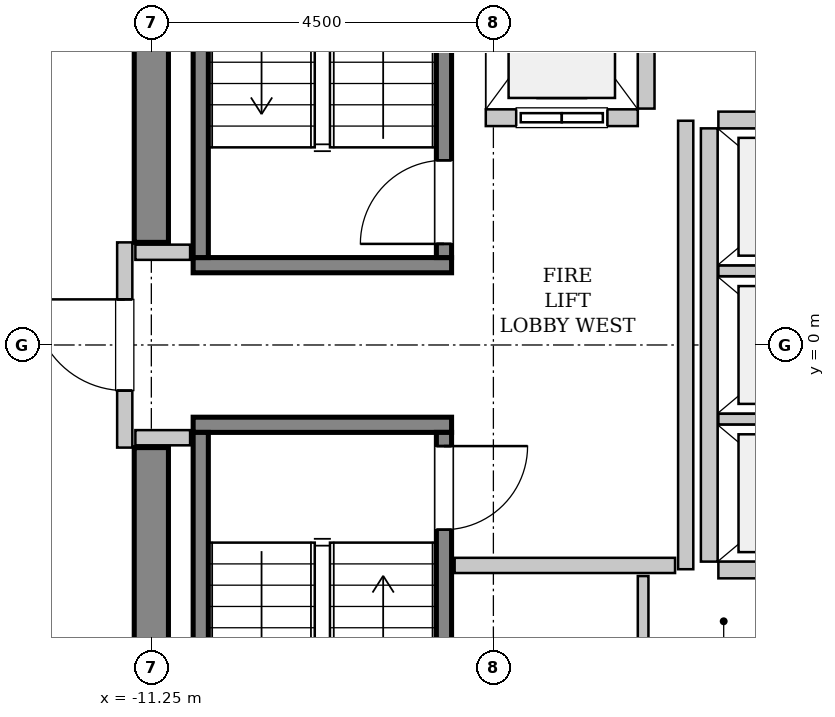
"""IFC4 building model, lengths in metres.
Left out: names, types, materials, properties, quantities, classifications, styles, units other than length and angle.
Written with IfcOpenShell. Run it as: python <this file> out.ifc"""

import sys

from ifc_helpers import new_model, si_unit, direction, frame, frame_2d, origin, place, context, subcontext, project, spatial, rectangle, extrude, source, transform, mapped, element, fill, save


model = new_model("IFC4")
c1 = context("Model", 3, precision=1e-05, world=origin(), true_north=direction((0.0, 1.0)))
c2 = subcontext(c1, "Body", "Model", "MODEL_VIEW")
j1 = project(units=[si_unit("LENGTHUNIT", "METRE"), si_unit("PLANEANGLEUNIT", "RADIAN")], contexts=[c1])
p1 = place(None, origin())
s1 = spatial("IfcSite", under=j1, at=p1, CompositionType="ELEMENT")
p2 = place(p1, origin())
s2 = spatial("IfcBuilding", under=s1, at=p2, CompositionType="ELEMENT")
p3 = place(p2, frame((0.0, 0.0, 259.8)))
s3 = spatial("IfcBuildingStorey", under=s2, at=p3, CompositionType="ELEMENT", Elevation=259.8)
m1 = source(origin(), c2, "Body", "SweptSolid", [
    extrude(rectangle(XDim=7.425, YDim=0.45, at=frame_2d((3.712, 0.0))), origin(), (0.0, 0.0, 1.0), 4.8),
])
for number, where, z_axis, x_axis in (
    (1, (-11.25, -8.775, 0.0), (0.0, 0.0, 1.0), (0.0, 1.0, 0.0)),
    (2, (-11.25, 1.35, 0.0), (0.0, 0.0, 1.0), (0.0, 1.0, 0.0)),
):
    element("IfcWall", number, at=place(p3, frame(where, z_axis=z_axis, x_axis=x_axis)), inside=s3, PredefinedType="SHEAR", context=c2, shape_type="MappedRepresentation", body=[
        mapped(m1, transform((0.0, 0.0, 0.0), x_axis=(1.0, 0.0, 0.0), y_axis=(0.0, 1.0, 0.0), z_axis=(0.0, 0.0, 1.0), scale=1.0)),
    ])
m2 = source(origin(), c2, "Body", "SweptSolid", [
    extrude(rectangle(XDim=3.4, YDim=0.2, at=frame_2d((1.7, 0.0))), origin(), (0.0, 0.0, 1.0), 4.8),
])
p4 = place(p3, frame((-7.3, 1.05, 0.0), z_axis=(0.0, 0.0, 1.0), x_axis=(-1.0, 0.0, 0.0)))
e3 = element("IfcWall", 3, at=p4, inside=s3, PredefinedType="SOLIDWALL", context=c2, shape_type="MappedRepresentation", body=[
    mapped(m2, transform((0.0, 0.0, 0.0), x_axis=(1.0, 0.0, 0.0), y_axis=(0.0, 1.0, 0.0), z_axis=(0.0, 0.0, 1.0), scale=1.0)),
])
m3 = source(origin(), c2, "Body", "SweptSolid", [
    extrude(rectangle(XDim=7.1, YDim=0.2, at=frame_2d((3.55, 0.0))), origin(), (0.0, 0.0, 1.0), 4.8),
])
p5 = place(p3, frame((-7.4, 1.15, 0.0), z_axis=(0.0, 0.0, 1.0), x_axis=(0.0, 1.0, 0.0)))
e4 = element("IfcWall", 4, at=p5, inside=s3, PredefinedType="SOLIDWALL", context=c2, shape_type="MappedRepresentation", body=[
    mapped(m3, transform((0.0, 0.0, 0.0), x_axis=(1.0, 0.0, 0.0), y_axis=(0.0, 1.0, 0.0), z_axis=(0.0, 0.0, 1.0), scale=1.0)),
])
p6 = place(p5, frame((0.18, 0.0, 0.0)))
e5 = element("IfcOpeningElement", 5, at=p6, cuts=e4, PredefinedType="OPENING", context=c2, shape_type="SweptSolid", body=[
    extrude(rectangle(XDim=1.1, YDim=2.15, at=frame_2d((0.55, 1.075))), frame((0.0, 0.11, 0.0), z_axis=(0.0, -1.0, 0.0), x_axis=(1.0, 0.0, 0.0)), (0.0, 0.0, 1.0), 0.22),
])
p7 = place(p3, frame((-10.6, 1.15, 0.0), z_axis=(0.0, 0.0, 1.0), x_axis=(0.0, 1.0, 0.0)))
e6 = element("IfcWall", 6, at=p7, inside=s3, PredefinedType="SOLIDWALL", context=c2, shape_type="MappedRepresentation", body=[
    mapped(m3, transform((0.0, 0.0, 0.0), x_axis=(1.0, 0.0, 0.0), y_axis=(0.0, 1.0, 0.0), z_axis=(0.0, 0.0, 1.0), scale=1.0)),
])
p8 = place(p3, frame((-10.7, -1.05, 0.0), z_axis=(0.0, 0.0, 1.0), x_axis=(1.0, 0.0, 0.0)))
e7 = element("IfcWall", 7, at=p8, inside=s3, PredefinedType="SOLIDWALL", context=c2, shape_type="MappedRepresentation", body=[
    mapped(m2, transform((0.0, 0.0, 0.0), x_axis=(1.0, 0.0, 0.0), y_axis=(0.0, 1.0, 0.0), z_axis=(0.0, 0.0, 1.0), scale=1.0)),
])
p9 = place(p3, frame((-10.6, -1.15, 0.0), z_axis=(0.0, 0.0, 1.0), x_axis=(0.0, -1.0, 0.0)))
e8 = element("IfcWall", 8, at=p9, inside=s3, PredefinedType="SOLIDWALL", context=c2, shape_type="MappedRepresentation", body=[
    mapped(m3, transform((0.0, 0.0, 0.0), x_axis=(1.0, 0.0, 0.0), y_axis=(0.0, 1.0, 0.0), z_axis=(0.0, 0.0, 1.0), scale=1.0)),
])
p10 = place(p3, frame((-7.4, -1.15, 0.0), z_axis=(0.0, 0.0, 1.0), x_axis=(0.0, -1.0, 0.0)))
e9 = element("IfcWall", 9, at=p10, inside=s3, PredefinedType="SOLIDWALL", context=c2, shape_type="MappedRepresentation", body=[
    mapped(m3, transform((0.0, 0.0, 0.0), x_axis=(1.0, 0.0, 0.0), y_axis=(0.0, 1.0, 0.0), z_axis=(0.0, 0.0, 1.0), scale=1.0)),
])
p11 = place(p10, frame((0.18, 0.0, 0.0)))
e10 = element("IfcOpeningElement", 10, at=p11, cuts=e9, PredefinedType="OPENING", context=c2, shape_type="SweptSolid", body=[
    extrude(rectangle(XDim=1.1, YDim=2.15, at=frame_2d((0.55, 1.075))), frame((0.0, 0.11, 0.0), z_axis=(0.0, -1.0, 0.0), x_axis=(1.0, 0.0, 0.0)), (0.0, 0.0, 1.0), 0.22),
])
m4 = source(origin(), c2, "Body", "SweptSolid", [
    extrude(rectangle(XDim=2.0, YDim=0.22, at=frame_2d((1.0, 0.0))), origin(), (0.0, 0.0, 1.0), 4.535),
])
p12 = place(p3, frame((-6.85, 2.99, 0.0), z_axis=(0.0, 0.0, 1.0), x_axis=(1.0, 0.0, 0.0)))
e11 = element("IfcWall", 11, at=p12, inside=s3, PredefinedType="SOLIDWALL", context=c2, shape_type="MappedRepresentation", body=[
    mapped(m4, transform((0.0, 0.0, 0.0), x_axis=(1.0, 0.0, 0.0), y_axis=(0.0, 1.0, 0.0), z_axis=(0.0, 0.0, 1.0), scale=1.0)),
])
p13 = place(p12, frame((0.4, 0.0, 0.0)))
e12 = element("IfcOpeningElement", 12, at=p13, cuts=e11, PredefinedType="OPENING", context=c2, shape_type="SweptSolid", body=[
    extrude(rectangle(XDim=1.2, YDim=2.2, at=frame_2d((0.6, 1.1))), frame((0.0, 0.12, 0.0), z_axis=(0.0, -1.0, 0.0), x_axis=(1.0, 0.0, 0.0)), (0.0, 0.0, 1.0), 0.24),
])
m5 = source(origin(), c2, "Body", "SweptSolid", [
    extrude(rectangle(XDim=2.68, YDim=0.22, at=frame_2d((1.34, 0.0))), origin(), (0.0, 0.0, 1.0), 4.535),
])
p14 = place(p3, frame((-4.74, 3.11, 0.0), z_axis=(0.0, 0.0, 1.0), x_axis=(0.0, 1.0, 0.0)))
e13 = element("IfcWall", 13, at=p14, inside=s3, PredefinedType="SOLIDWALL", context=c2, shape_type="MappedRepresentation", body=[
    mapped(m5, transform((0.0, 0.0, 0.0), x_axis=(1.0, 0.0, 0.0), y_axis=(0.0, 1.0, 0.0), z_axis=(0.0, 0.0, 1.0), scale=1.0)),
])
m6 = source(origin(), c2, "Body", "SweptSolid", [
    extrude(rectangle(XDim=5.7, YDim=0.22, at=frame_2d((2.85, 0.0))), origin(), (0.0, 0.0, 1.0), 4.535),
])
p15 = place(p3, frame((-3.91, 2.85, 0.0), z_axis=(0.0, 0.0, 1.0), x_axis=(0.0, -1.0, 0.0)))
e14 = element("IfcWall", 14, at=p15, inside=s3, PredefinedType="SOLIDWALL", context=c2, shape_type="MappedRepresentation", body=[
    mapped(m6, transform((0.0, 0.0, 0.0), x_axis=(1.0, 0.0, 0.0), y_axis=(0.0, 1.0, 0.0), z_axis=(0.0, 0.0, 1.0), scale=1.0)),
])
m7 = source(origin(), c2, "Body", "SweptSolid", [
    extrude(rectangle(XDim=2.13, YDim=0.22, at=frame_2d((1.065, 0.0))), origin(), (0.0, 0.0, 1.0), 4.535),
])
p16 = place(p3, frame((-3.79, -2.96, 0.0), z_axis=(0.0, 0.0, 1.0), x_axis=(1.0, 0.0, 0.0)))
e15 = element("IfcWall", 15, at=p16, inside=s3, PredefinedType="SOLIDWALL", context=c2, shape_type="MappedRepresentation", body=[
    mapped(m7, transform((0.0, 0.0, 0.0), x_axis=(1.0, 0.0, 0.0), y_axis=(0.0, 1.0, 0.0), z_axis=(0.0, 0.0, 1.0), scale=1.0)),
])
m8 = source(origin(), c2, "Body", "SweptSolid", [
    extrude(rectangle(XDim=2.13, YDim=0.14, at=frame_2d((1.065, 0.0))), origin(), (0.0, 0.0, 1.0), 4.535),
])
for number, where, z_axis, x_axis in (
    (16, (-3.79, -0.975, 0.0), (0.0, 0.0, 1.0), (1.0, 0.0, 0.0)),
    (17, (-3.79, 0.975, 0.0), (0.0, 0.0, 1.0), (1.0, 0.0, 0.0)),
):
    element("IfcWall", number, at=place(p3, frame(where, z_axis=z_axis, x_axis=x_axis)), inside=s3, PredefinedType="PARTITIONING", context=c2, shape_type="MappedRepresentation", body=[
        mapped(m8, transform((0.0, 0.0, 0.0), x_axis=(1.0, 0.0, 0.0), y_axis=(0.0, 1.0, 0.0), z_axis=(0.0, 0.0, 1.0), scale=1.0)),
    ])
p17 = place(p3, frame((-1.66, 2.96, 0.0), z_axis=(0.0, 0.0, 1.0), x_axis=(-1.0, 0.0, 0.0)))
e18 = element("IfcWall", 18, at=p17, inside=s3, PredefinedType="SOLIDWALL", context=c2, shape_type="MappedRepresentation", body=[
    mapped(m7, transform((0.0, 0.0, 0.0), x_axis=(1.0, 0.0, 0.0), y_axis=(0.0, 1.0, 0.0), z_axis=(0.0, 0.0, 1.0), scale=1.0)),
])
m9 = source(origin(), c2, "Body", "SweptSolid", [
    extrude(rectangle(XDim=2.7, YDim=0.2, at=frame_2d((1.35, 0.0))), origin(), (0.0, 0.0, 1.0), 3.625),
])
p18 = place(p3, frame((-11.6, -1.35, 0.0), z_axis=(0.0, 0.0, 1.0), x_axis=(0.0, 1.0, 0.0)))
e19 = element("IfcWall", 19, at=p18, inside=s3, PredefinedType="PARTITIONING", context=c2, shape_type="MappedRepresentation", body=[
    mapped(m9, transform((0.0, 0.0, 0.0), x_axis=(1.0, 0.0, 0.0), y_axis=(0.0, 1.0, 0.0), z_axis=(0.0, 0.0, 1.0), scale=1.0)),
])
p19 = place(p18, frame((0.75, 0.0, 0.0)))
e20 = element("IfcOpeningElement", 20, at=p19, cuts=e19, PredefinedType="OPENING", context=c2, shape_type="SweptSolid", body=[
    extrude(rectangle(XDim=1.2, YDim=2.15, at=frame_2d((0.6, 1.075))), frame((0.0, 0.11, 0.0), z_axis=(0.0, -1.0, 0.0), x_axis=(1.0, 0.0, 0.0)), (0.0, 0.0, 1.0), 0.22),
])
m10 = source(origin(), c2, "Body", "SweptSolid", [
    extrude(rectangle(XDim=5.9, YDim=0.2, at=frame_2d((2.95, 0.0))), origin(), (0.0, 0.0, 1.0), 4.535),
])
p20 = place(p3, frame((-4.22, -2.95, 0.0), z_axis=(0.0, 0.0, 1.0), x_axis=(0.0, 1.0, 0.0)))
e21 = element("IfcWall", 21, at=p20, inside=s3, PredefinedType="PARTITIONING", context=c2, shape_type="MappedRepresentation", body=[
    mapped(m10, transform((0.0, 0.0, 0.0), x_axis=(1.0, 0.0, 0.0), y_axis=(0.0, 1.0, 0.0), z_axis=(0.0, 0.0, 1.0), scale=1.0)),
])
m11 = source(origin(), c2, "Body", "SweptSolid", [
    extrude(rectangle(XDim=2.9, YDim=0.2, at=frame_2d((1.45, 0.0))), origin(), (0.0, 0.0, 1.0), 4.535),
])
p21 = place(p3, frame((-7.26, -2.9, 0.0), z_axis=(0.0, 0.0, 1.0), x_axis=(1.0, 0.0, 0.0)))
e22 = element("IfcWall", 22, at=p21, inside=s3, PredefinedType="PARTITIONING", context=c2, shape_type="MappedRepresentation", body=[
    mapped(m11, transform((0.0, 0.0, 0.0), x_axis=(1.0, 0.0, 0.0), y_axis=(0.0, 1.0, 0.0), z_axis=(0.0, 0.0, 1.0), scale=1.0)),
])
m12 = source(origin(), c2, "Body", "SweptSolid", [
    extrude(rectangle(XDim=0.72, YDim=0.2, at=frame_2d((0.36, 0.0))), origin(), (0.0, 0.0, 1.0), 4.535),
])
for number, where, z_axis, x_axis in (
    (23, (-11.46, 1.22, 0.0), (0.0, 0.0, 1.0), (1.0, 0.0, 0.0)),
    (24, (-11.46, -1.22, 0.0), (0.0, 0.0, 1.0), (1.0, 0.0, 0.0)),
):
    element("IfcWall", number, at=place(p3, frame(where, z_axis=z_axis, x_axis=x_axis)), inside=s3, PredefinedType="PARTITIONING", context=c2, shape_type="MappedRepresentation", body=[
        mapped(m12, transform((0.0, 0.0, 0.0), x_axis=(1.0, 0.0, 0.0), y_axis=(0.0, 1.0, 0.0), z_axis=(0.0, 0.0, 1.0), scale=1.0)),
    ])
m13 = source(origin(), c2, "Body", "SweptSolid", [
    extrude(rectangle(XDim=1.1, YDim=0.14, at=frame_2d((0.55, 0.0))), origin(), (0.0, 0.0, 1.0), 4.535),
])
p22 = place(p3, frame((-4.78, -4.14, 0.0), z_axis=(0.0, 0.0, 1.0), x_axis=(0.0, 1.0, 0.0)))
e25 = element("IfcWall", 25, at=p22, inside=s3, PredefinedType="PARTITIONING", context=c2, shape_type="MappedRepresentation", body=[
    mapped(m13, transform((0.0, 0.0, 0.0), x_axis=(1.0, 0.0, 0.0), y_axis=(0.0, 1.0, 0.0), z_axis=(0.0, 0.0, 1.0), scale=1.0)),
])
m14 = source(origin(), c2, "Body", "SweptSolid", [
    extrude(rectangle(XDim=1.1, YDim=2.15, at=frame_2d((0.55, 1.075))), frame((0.0, 0.025, 0.0), z_axis=(0.0, -1.0, 0.0), x_axis=(1.0, 0.0, 0.0)), (0.0, 0.0, 1.0), 0.05),
])
p23 = place(p6, origin())
e26 = element("IfcDoor", 26, at=p23, inside=s3, OperationType="SINGLE_SWING_LEFT", PredefinedType="DOOR", context=c2, shape_type="MappedRepresentation", body=[
    mapped(m14, transform((0.0, 0.0, 0.0), x_axis=(1.0, 0.0, 0.0), y_axis=(0.0, 1.0, 0.0), z_axis=(0.0, 0.0, 1.0), scale=1.0)),
])
fill(e5, e26)
p24 = place(p11, origin())
e27 = element("IfcDoor", 27, at=p24, inside=s3, OperationType="SINGLE_SWING_LEFT", PredefinedType="DOOR", context=c2, shape_type="MappedRepresentation", body=[
    mapped(m14, transform((0.0, 0.0, 0.0), x_axis=(1.0, 0.0, 0.0), y_axis=(0.0, 1.0, 0.0), z_axis=(0.0, 0.0, 1.0), scale=1.0)),
])
fill(e10, e27)
m15 = source(origin(), c2, "Body", "SweptSolid", [
    extrude(rectangle(XDim=1.2, YDim=2.2, at=frame_2d((0.6, 1.1))), frame((0.0, 0.025, 0.0), z_axis=(0.0, -1.0, 0.0), x_axis=(1.0, 0.0, 0.0)), (0.0, 0.0, 1.0), 0.05),
])
p25 = place(p13, origin())
e28 = element("IfcDoor", 28, at=p25, inside=s3, OperationType="SLIDING_TO_LEFT", PredefinedType="DOOR", context=c2, shape_type="MappedRepresentation", body=[
    mapped(m15, transform((0.0, 0.0, 0.0), x_axis=(1.0, 0.0, 0.0), y_axis=(0.0, 1.0, 0.0), z_axis=(0.0, 0.0, 1.0), scale=1.0)),
])
fill(e12, e28)
m16 = source(origin(), c2, "Body", "SweptSolid", [
    extrude(rectangle(XDim=1.2, YDim=2.15, at=frame_2d((0.6, 1.075))), frame((0.0, 0.025, 0.0), z_axis=(0.0, -1.0, 0.0), x_axis=(1.0, 0.0, 0.0)), (0.0, 0.0, 1.0), 0.05),
])
p26 = place(p19, origin())
e29 = element("IfcDoor", 29, at=p26, inside=s3, OperationType="SINGLE_SWING_RIGHT", PredefinedType="DOOR", context=c2, shape_type="MappedRepresentation", body=[
    mapped(m16, transform((0.0, 0.0, 0.0), x_axis=(1.0, 0.0, 0.0), y_axis=(0.0, 1.0, 0.0), z_axis=(0.0, 0.0, 1.0), scale=1.0)),
])
fill(e20, e29)
save(model, sys.argv[1])
